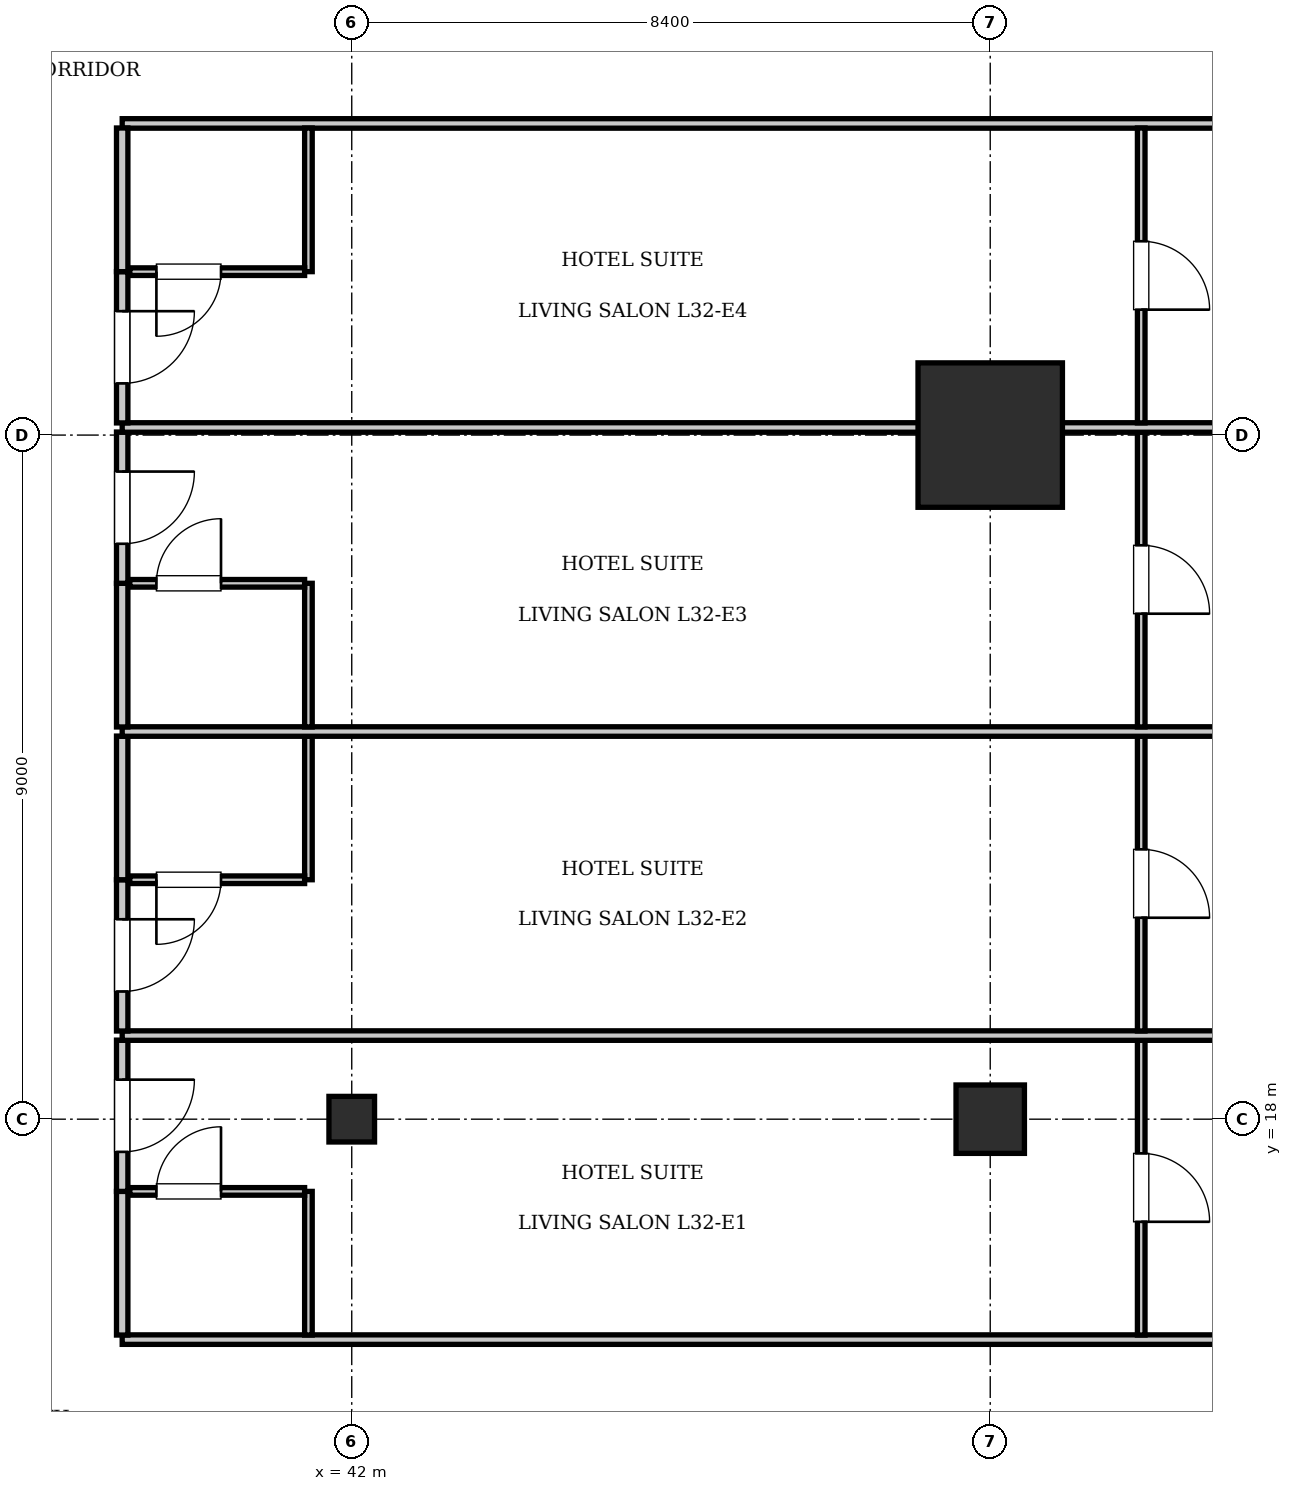
"""IFC4 building model, lengths in metres.
Left out: names, types, materials, properties, quantities, classifications, styles, units other than length and angle.
Written with IfcOpenShell. Run it as: python <this file> out.ifc"""

import sys

from ifc_helpers import new_model, si_unit, direction, frame, frame_2d, origin, origin_2d, place, context, subcontext, project, spatial, rectangle, i_section, extrude, element, fill, save


model = new_model("IFC4")
c1 = context("Model", 3, precision=1e-05, world=origin(), true_north=direction((0.0, 1.0)))
c2 = subcontext(c1, "Body", "Model", "MODEL_VIEW")
j1 = project(units=[si_unit("LENGTHUNIT", "METRE"), si_unit("PLANEANGLEUNIT", "RADIAN")], contexts=[c1])
p1 = place(None, origin())
s1 = spatial("IfcSite", under=j1, at=p1, CompositionType="ELEMENT")
p2 = place(p1, origin())
s2 = spatial("IfcBuilding", under=s1, at=p2, CompositionType="ELEMENT")
p3 = place(p2, frame((0.0, 0.0, 135.1)))
s3 = spatial("IfcBuildingStorey", under=s2, at=p3, CompositionType="ELEMENT", Elevation=135.1)
p4 = place(p3, frame((50.4, 27.0, 0.0), z_axis=(0.0, 0.0, 1.0), x_axis=(1.0, 0.0, 0.0)))
e1 = element("IfcColumn", 1, at=p4, inside=s3, PredefinedType="COLUMN", context=c2, shape_type="SweptSolid", body=[
    extrude(rectangle(XDim=1.9, YDim=1.9, at=origin_2d()), origin(), (0.0, 0.0, 1.0), 3.85),
])
p5 = place(p3, frame((50.4, 18.0, 0.0), z_axis=(0.0, 0.0, 1.0), x_axis=(1.0, 0.0, 0.0)))
e2 = element("IfcColumn", 2, at=p5, inside=s3, PredefinedType="COLUMN", context=c2, shape_type="SweptSolid", body=[
    extrude(rectangle(XDim=0.9, YDim=0.9, at=origin_2d()), origin(), (0.0, 0.0, 1.0), 3.85),
])
p6 = place(p3, frame((42.0, 18.0, 0.0), z_axis=(0.0, 0.0, 1.0), x_axis=(1.0, 0.0, 0.0)))
e3 = element("IfcColumn", 3, at=p6, inside=s3, PredefinedType="COLUMN", context=c2, shape_type="SweptSolid", body=[
    extrude(i_section(OverallWidth=0.6, OverallDepth=0.6, WebThickness=0.025, FlangeThickness=0.038, at=origin_2d()), origin(), (0.0, 0.0, 1.0), 3.85),
])
for number, where, z_axis, x_axis in (
    (4, (38.98, 15.1, 0.0), (0.0, 0.0, 1.0), (1.0, 0.0, 0.0)),
    (5, (38.98, 31.1, 0.0), (0.0, 0.0, 1.0), (1.0, 0.0, 0.0)),
):
    element("IfcWall", number, at=place(p3, frame(where, z_axis=z_axis, x_axis=x_axis)), inside=s3, PredefinedType="PARTITIONING", context=c2, shape_type="SweptSolid", body=[
        extrude(rectangle(XDim=23.42, YDim=0.125, at=frame_2d((11.71, 0.0))), origin(), (0.0, 0.0, 1.0), 3.61),
    ])
p7 = place(p3, frame((38.98, 15.16, 0.0), z_axis=(0.0, 0.0, 1.0), x_axis=(0.0, 1.0, 0.0)))
e6 = element("IfcWall", 6, at=p7, inside=s3, PredefinedType="PARTITIONING", context=c2, shape_type="SweptSolid", body=[
    extrude(rectangle(XDim=1.89, YDim=0.15, at=frame_2d((0.945, 0.0))), origin(), (0.0, 0.0, 1.0), 3.61),
])
p8 = place(p3, frame((38.98, 17.05, 0.0), z_axis=(0.0, 0.0, 1.0), x_axis=(0.0, 1.0, 0.0)))
e7 = element("IfcWall", 7, at=p8, inside=s3, PredefinedType="PARTITIONING", context=c2, shape_type="SweptSolid", body=[
    extrude(rectangle(XDim=1.99, YDim=0.15, at=frame_2d((0.995, 0.0))), origin(), (0.0, 0.0, 1.0), 3.61),
])
p9 = place(p8, frame((0.52, 0.0, 0.0)))
e8 = element("IfcOpeningElement", 8, at=p9, cuts=e7, PredefinedType="OPENING", context=c2, shape_type="SweptSolid", body=[
    extrude(rectangle(XDim=0.95, YDim=2.15, at=frame_2d((0.475, 1.075))), frame((0.0, 0.085, 0.0), z_axis=(0.0, -1.0, 0.0), x_axis=(1.0, 0.0, 0.0)), (0.0, 0.0, 1.0), 0.17),
])
p10 = place(p3, frame((41.43, 15.16, 0.0), z_axis=(0.0, 0.0, 1.0), x_axis=(0.0, 1.0, 0.0)))
e9 = element("IfcWall", 9, at=p10, inside=s3, PredefinedType="PARTITIONING", context=c2, shape_type="SweptSolid", body=[
    extrude(rectangle(XDim=1.89, YDim=0.1, at=frame_2d((0.945, 0.0))), origin(), (0.0, 0.0, 1.0), 3.61),
])
p11 = place(p3, frame((39.08, 17.05, 0.0), z_axis=(0.0, 0.0, 1.0), x_axis=(1.0, 0.0, 0.0)))
e10 = element("IfcWall", 10, at=p11, inside=s3, PredefinedType="PARTITIONING", context=c2, shape_type="SweptSolid", body=[
    extrude(rectangle(XDim=2.3, YDim=0.1, at=frame_2d((1.15, 0.0))), origin(), (0.0, 0.0, 1.0), 3.61),
])
p12 = place(p11, frame((0.35, 0.0, 0.0)))
e11 = element("IfcOpeningElement", 11, at=p12, cuts=e10, PredefinedType="OPENING", context=c2, shape_type="SweptSolid", body=[
    extrude(rectangle(XDim=0.85, YDim=2.1, at=frame_2d((0.425, 1.05))), frame((0.0, 0.06, 0.0), z_axis=(0.0, -1.0, 0.0), x_axis=(1.0, 0.0, 0.0)), (0.0, 0.0, 1.0), 0.12),
])
p13 = place(p3, frame((52.386, 15.16, 0.0), z_axis=(0.0, 0.0, 1.0), x_axis=(0.0, 1.0, 0.0)))
e12 = element("IfcWall", 12, at=p13, inside=s3, PredefinedType="PARTITIONING", context=c2, shape_type="SweptSolid", body=[
    extrude(rectangle(XDim=3.88, YDim=0.1, at=frame_2d((1.94, 0.0))), origin(), (0.0, 0.0, 1.0), 3.61),
])
p14 = place(p13, frame((1.49, 0.0, 0.0)))
e13 = element("IfcOpeningElement", 13, at=p14, cuts=e12, PredefinedType="OPENING", context=c2, shape_type="SweptSolid", body=[
    extrude(rectangle(XDim=0.9, YDim=2.1, at=frame_2d((0.45, 1.05))), frame((0.0, 0.06, 0.0), z_axis=(0.0, -1.0, 0.0), x_axis=(1.0, 0.0, 0.0)), (0.0, 0.0, 1.0), 0.12),
])
p15 = place(p3, frame((38.98, 19.1, 0.0), z_axis=(0.0, 0.0, 1.0), x_axis=(1.0, 0.0, 0.0)))
e14 = element("IfcWall", 14, at=p15, inside=s3, PredefinedType="PARTITIONING", context=c2, shape_type="SweptSolid", body=[
    extrude(rectangle(XDim=23.42, YDim=0.125, at=frame_2d((11.71, 0.0))), origin(), (0.0, 0.0, 1.0), 3.61),
])
p16 = place(p3, frame((38.98, 19.16, 0.0), z_axis=(0.0, 0.0, 1.0), x_axis=(0.0, 1.0, 0.0)))
e15 = element("IfcWall", 15, at=p16, inside=s3, PredefinedType="PARTITIONING", context=c2, shape_type="SweptSolid", body=[
    extrude(rectangle(XDim=1.99, YDim=0.15, at=frame_2d((0.995, 0.0))), origin(), (0.0, 0.0, 1.0), 3.61),
])
p17 = place(p16, frame((0.52, 0.0, 0.0)))
e16 = element("IfcOpeningElement", 16, at=p17, cuts=e15, PredefinedType="OPENING", context=c2, shape_type="SweptSolid", body=[
    extrude(rectangle(XDim=0.95, YDim=2.15, at=frame_2d((0.475, 1.075))), frame((0.0, 0.085, 0.0), z_axis=(0.0, -1.0, 0.0), x_axis=(1.0, 0.0, 0.0)), (0.0, 0.0, 1.0), 0.17),
])
p18 = place(p3, frame((38.98, 21.15, 0.0), z_axis=(0.0, 0.0, 1.0), x_axis=(0.0, 1.0, 0.0)))
e17 = element("IfcWall", 17, at=p18, inside=s3, PredefinedType="PARTITIONING", context=c2, shape_type="SweptSolid", body=[
    extrude(rectangle(XDim=1.89, YDim=0.15, at=frame_2d((0.945, 0.0))), origin(), (0.0, 0.0, 1.0), 3.61),
])
p19 = place(p3, frame((41.43, 21.15, 0.0), z_axis=(0.0, 0.0, 1.0), x_axis=(0.0, 1.0, 0.0)))
e18 = element("IfcWall", 18, at=p19, inside=s3, PredefinedType="PARTITIONING", context=c2, shape_type="SweptSolid", body=[
    extrude(rectangle(XDim=1.89, YDim=0.1, at=frame_2d((0.945, 0.0))), origin(), (0.0, 0.0, 1.0), 3.61),
])
p20 = place(p3, frame((39.08, 21.15, 0.0), z_axis=(0.0, 0.0, 1.0), x_axis=(1.0, 0.0, 0.0)))
e19 = element("IfcWall", 19, at=p20, inside=s3, PredefinedType="PARTITIONING", context=c2, shape_type="SweptSolid", body=[
    extrude(rectangle(XDim=2.3, YDim=0.1, at=frame_2d((1.15, 0.0))), origin(), (0.0, 0.0, 1.0), 3.61),
])
p21 = place(p20, frame((0.35, 0.0, 0.0)))
e20 = element("IfcOpeningElement", 20, at=p21, cuts=e19, PredefinedType="OPENING", context=c2, shape_type="SweptSolid", body=[
    extrude(rectangle(XDim=0.85, YDim=2.1, at=frame_2d((0.425, 1.05))), frame((0.0, 0.06, 0.0), z_axis=(0.0, -1.0, 0.0), x_axis=(1.0, 0.0, 0.0)), (0.0, 0.0, 1.0), 0.12),
])
p22 = place(p3, frame((52.386, 19.16, 0.0), z_axis=(0.0, 0.0, 1.0), x_axis=(0.0, 1.0, 0.0)))
e21 = element("IfcWall", 21, at=p22, inside=s3, PredefinedType="PARTITIONING", context=c2, shape_type="SweptSolid", body=[
    extrude(rectangle(XDim=3.88, YDim=0.1, at=frame_2d((1.94, 0.0))), origin(), (0.0, 0.0, 1.0), 3.61),
])
p23 = place(p22, frame((1.49, 0.0, 0.0)))
e22 = element("IfcOpeningElement", 22, at=p23, cuts=e21, PredefinedType="OPENING", context=c2, shape_type="SweptSolid", body=[
    extrude(rectangle(XDim=0.9, YDim=2.1, at=frame_2d((0.45, 1.05))), frame((0.0, 0.06, 0.0), z_axis=(0.0, -1.0, 0.0), x_axis=(1.0, 0.0, 0.0)), (0.0, 0.0, 1.0), 0.12),
])
p24 = place(p3, frame((38.98, 23.1, 0.0), z_axis=(0.0, 0.0, 1.0), x_axis=(1.0, 0.0, 0.0)))
e23 = element("IfcWall", 23, at=p24, inside=s3, PredefinedType="PARTITIONING", context=c2, shape_type="SweptSolid", body=[
    extrude(rectangle(XDim=23.42, YDim=0.125, at=frame_2d((11.71, 0.0))), origin(), (0.0, 0.0, 1.0), 3.61),
])
p25 = place(p3, frame((38.98, 23.16, 0.0), z_axis=(0.0, 0.0, 1.0), x_axis=(0.0, 1.0, 0.0)))
e24 = element("IfcWall", 24, at=p25, inside=s3, PredefinedType="PARTITIONING", context=c2, shape_type="SweptSolid", body=[
    extrude(rectangle(XDim=1.89, YDim=0.15, at=frame_2d((0.945, 0.0))), origin(), (0.0, 0.0, 1.0), 3.61),
])
p26 = place(p3, frame((38.98, 25.05, 0.0), z_axis=(0.0, 0.0, 1.0), x_axis=(0.0, 1.0, 0.0)))
e25 = element("IfcWall", 25, at=p26, inside=s3, PredefinedType="PARTITIONING", context=c2, shape_type="SweptSolid", body=[
    extrude(rectangle(XDim=1.99, YDim=0.15, at=frame_2d((0.995, 0.0))), origin(), (0.0, 0.0, 1.0), 3.61),
])
p27 = place(p26, frame((0.52, 0.0, 0.0)))
e26 = element("IfcOpeningElement", 26, at=p27, cuts=e25, PredefinedType="OPENING", context=c2, shape_type="SweptSolid", body=[
    extrude(rectangle(XDim=0.95, YDim=2.15, at=frame_2d((0.475, 1.075))), frame((0.0, 0.085, 0.0), z_axis=(0.0, -1.0, 0.0), x_axis=(1.0, 0.0, 0.0)), (0.0, 0.0, 1.0), 0.17),
])
p28 = place(p3, frame((41.43, 23.16, 0.0), z_axis=(0.0, 0.0, 1.0), x_axis=(0.0, 1.0, 0.0)))
e27 = element("IfcWall", 27, at=p28, inside=s3, PredefinedType="PARTITIONING", context=c2, shape_type="SweptSolid", body=[
    extrude(rectangle(XDim=1.89, YDim=0.1, at=frame_2d((0.945, 0.0))), origin(), (0.0, 0.0, 1.0), 3.61),
])
p29 = place(p3, frame((39.08, 25.05, 0.0), z_axis=(0.0, 0.0, 1.0), x_axis=(1.0, 0.0, 0.0)))
e28 = element("IfcWall", 28, at=p29, inside=s3, PredefinedType="PARTITIONING", context=c2, shape_type="SweptSolid", body=[
    extrude(rectangle(XDim=2.3, YDim=0.1, at=frame_2d((1.15, 0.0))), origin(), (0.0, 0.0, 1.0), 3.61),
])
p30 = place(p29, frame((0.35, 0.0, 0.0)))
e29 = element("IfcOpeningElement", 29, at=p30, cuts=e28, PredefinedType="OPENING", context=c2, shape_type="SweptSolid", body=[
    extrude(rectangle(XDim=0.85, YDim=2.1, at=frame_2d((0.425, 1.05))), frame((0.0, 0.06, 0.0), z_axis=(0.0, -1.0, 0.0), x_axis=(1.0, 0.0, 0.0)), (0.0, 0.0, 1.0), 0.12),
])
p31 = place(p3, frame((52.386, 23.16, 0.0), z_axis=(0.0, 0.0, 1.0), x_axis=(0.0, 1.0, 0.0)))
e30 = element("IfcWall", 30, at=p31, inside=s3, PredefinedType="PARTITIONING", context=c2, shape_type="SweptSolid", body=[
    extrude(rectangle(XDim=3.88, YDim=0.1, at=frame_2d((1.94, 0.0))), origin(), (0.0, 0.0, 1.0), 3.61),
])
p32 = place(p31, frame((1.49, 0.0, 0.0)))
e31 = element("IfcOpeningElement", 31, at=p32, cuts=e30, PredefinedType="OPENING", context=c2, shape_type="SweptSolid", body=[
    extrude(rectangle(XDim=0.9, YDim=2.1, at=frame_2d((0.45, 1.05))), frame((0.0, 0.06, 0.0), z_axis=(0.0, -1.0, 0.0), x_axis=(1.0, 0.0, 0.0)), (0.0, 0.0, 1.0), 0.12),
])
p33 = place(p3, frame((38.98, 27.1, 0.0), z_axis=(0.0, 0.0, 1.0), x_axis=(1.0, 0.0, 0.0)))
e32 = element("IfcWall", 32, at=p33, inside=s3, PredefinedType="PARTITIONING", context=c2, shape_type="SweptSolid", body=[
    extrude(rectangle(XDim=23.42, YDim=0.125, at=frame_2d((11.71, 0.0))), origin(), (0.0, 0.0, 1.0), 2.41),
])
p34 = place(p3, frame((38.98, 27.16, 0.0), z_axis=(0.0, 0.0, 1.0), x_axis=(0.0, 1.0, 0.0)))
e33 = element("IfcWall", 33, at=p34, inside=s3, PredefinedType="PARTITIONING", context=c2, shape_type="SweptSolid", body=[
    extrude(rectangle(XDim=1.99, YDim=0.15, at=frame_2d((0.995, 0.0))), origin(), (0.0, 0.0, 1.0), 3.61),
])
p35 = place(p34, frame((0.52, 0.0, 0.0)))
e34 = element("IfcOpeningElement", 34, at=p35, cuts=e33, PredefinedType="OPENING", context=c2, shape_type="SweptSolid", body=[
    extrude(rectangle(XDim=0.95, YDim=2.15, at=frame_2d((0.475, 1.075))), frame((0.0, 0.085, 0.0), z_axis=(0.0, -1.0, 0.0), x_axis=(1.0, 0.0, 0.0)), (0.0, 0.0, 1.0), 0.17),
])
p36 = place(p3, frame((38.98, 29.15, 0.0), z_axis=(0.0, 0.0, 1.0), x_axis=(0.0, 1.0, 0.0)))
e35 = element("IfcWall", 35, at=p36, inside=s3, PredefinedType="PARTITIONING", context=c2, shape_type="SweptSolid", body=[
    extrude(rectangle(XDim=1.89, YDim=0.15, at=frame_2d((0.945, 0.0))), origin(), (0.0, 0.0, 1.0), 3.61),
])
p37 = place(p3, frame((41.43, 29.15, 0.0), z_axis=(0.0, 0.0, 1.0), x_axis=(0.0, 1.0, 0.0)))
e36 = element("IfcWall", 36, at=p37, inside=s3, PredefinedType="PARTITIONING", context=c2, shape_type="SweptSolid", body=[
    extrude(rectangle(XDim=1.89, YDim=0.1, at=frame_2d((0.945, 0.0))), origin(), (0.0, 0.0, 1.0), 3.61),
])
p38 = place(p3, frame((39.08, 29.15, 0.0), z_axis=(0.0, 0.0, 1.0), x_axis=(1.0, 0.0, 0.0)))
e37 = element("IfcWall", 37, at=p38, inside=s3, PredefinedType="PARTITIONING", context=c2, shape_type="SweptSolid", body=[
    extrude(rectangle(XDim=2.3, YDim=0.1, at=frame_2d((1.15, 0.0))), origin(), (0.0, 0.0, 1.0), 3.61),
])
p39 = place(p38, frame((0.35, 0.0, 0.0)))
e38 = element("IfcOpeningElement", 38, at=p39, cuts=e37, PredefinedType="OPENING", context=c2, shape_type="SweptSolid", body=[
    extrude(rectangle(XDim=0.85, YDim=2.1, at=frame_2d((0.425, 1.05))), frame((0.0, 0.06, 0.0), z_axis=(0.0, -1.0, 0.0), x_axis=(1.0, 0.0, 0.0)), (0.0, 0.0, 1.0), 0.12),
])
p40 = place(p3, frame((52.386, 27.16, 0.0), z_axis=(0.0, 0.0, 1.0), x_axis=(0.0, 1.0, 0.0)))
e39 = element("IfcWall", 39, at=p40, inside=s3, PredefinedType="PARTITIONING", context=c2, shape_type="SweptSolid", body=[
    extrude(rectangle(XDim=3.88, YDim=0.1, at=frame_2d((1.94, 0.0))), origin(), (0.0, 0.0, 1.0), 3.61),
])
p41 = place(p40, frame((1.49, 0.0, 0.0)))
e40 = element("IfcOpeningElement", 40, at=p41, cuts=e39, PredefinedType="OPENING", context=c2, shape_type="SweptSolid", body=[
    extrude(rectangle(XDim=0.9, YDim=2.1, at=frame_2d((0.45, 1.05))), frame((0.0, 0.06, 0.0), z_axis=(0.0, -1.0, 0.0), x_axis=(1.0, 0.0, 0.0)), (0.0, 0.0, 1.0), 0.12),
])
p42 = place(p12, origin())
e41 = element("IfcDoor", 41, at=p42, inside=s3, OperationType="SINGLE_SWING_RIGHT", PredefinedType="DOOR", context=c2, shape_type="SweptSolid", body=[
    extrude(rectangle(XDim=0.85, YDim=2.1, at=frame_2d((0.425, 1.05))), frame((0.0, 0.025, 0.0), z_axis=(0.0, -1.0, 0.0), x_axis=(1.0, 0.0, 0.0)), (0.0, 0.0, 1.0), 0.05),
])
fill(e11, e41)
p43 = place(p9, frame((0.95, 0.0, 0.0), z_axis=(0.0, 0.0, 1.0), x_axis=(-1.0, 0.0, 0.0)))
e42 = element("IfcDoor", 42, at=p43, inside=s3, OperationType="SINGLE_SWING_LEFT", PredefinedType="DOOR", context=c2, shape_type="SweptSolid", body=[
    extrude(rectangle(XDim=0.95, YDim=2.15, at=frame_2d((0.475, 1.075))), frame((0.0, 0.025, 0.0), z_axis=(0.0, -1.0, 0.0), x_axis=(1.0, 0.0, 0.0)), (0.0, 0.0, 1.0), 0.05),
])
fill(e8, e42)
p44 = place(p14, frame((0.9, 0.0, 0.0), z_axis=(0.0, 0.0, 1.0), x_axis=(-1.0, 0.0, 0.0)))
e43 = element("IfcDoor", 43, at=p44, inside=s3, OperationType="SINGLE_SWING_RIGHT", PredefinedType="DOOR", context=c2, shape_type="SweptSolid", body=[
    extrude(rectangle(XDim=0.9, YDim=2.1, at=frame_2d((0.45, 1.05))), frame((0.0, 0.025, 0.0), z_axis=(0.0, -1.0, 0.0), x_axis=(1.0, 0.0, 0.0)), (0.0, 0.0, 1.0), 0.05),
])
fill(e13, e43)
p45 = place(p21, frame((0.85, 0.0, 0.0), z_axis=(0.0, 0.0, 1.0), x_axis=(-1.0, 0.0, 0.0)))
e44 = element("IfcDoor", 44, at=p45, inside=s3, OperationType="SINGLE_SWING_RIGHT", PredefinedType="DOOR", context=c2, shape_type="SweptSolid", body=[
    extrude(rectangle(XDim=0.85, YDim=2.1, at=frame_2d((0.425, 1.05))), frame((0.0, 0.025, 0.0), z_axis=(0.0, -1.0, 0.0), x_axis=(1.0, 0.0, 0.0)), (0.0, 0.0, 1.0), 0.05),
])
fill(e20, e44)
p46 = place(p17, frame((0.95, 0.0, 0.0), z_axis=(0.0, 0.0, 1.0), x_axis=(-1.0, 0.0, 0.0)))
e45 = element("IfcDoor", 45, at=p46, inside=s3, OperationType="SINGLE_SWING_LEFT", PredefinedType="DOOR", context=c2, shape_type="SweptSolid", body=[
    extrude(rectangle(XDim=0.95, YDim=2.15, at=frame_2d((0.475, 1.075))), frame((0.0, 0.025, 0.0), z_axis=(0.0, -1.0, 0.0), x_axis=(1.0, 0.0, 0.0)), (0.0, 0.0, 1.0), 0.05),
])
fill(e16, e45)
p47 = place(p23, frame((0.9, 0.0, 0.0), z_axis=(0.0, 0.0, 1.0), x_axis=(-1.0, 0.0, 0.0)))
e46 = element("IfcDoor", 46, at=p47, inside=s3, OperationType="SINGLE_SWING_RIGHT", PredefinedType="DOOR", context=c2, shape_type="SweptSolid", body=[
    extrude(rectangle(XDim=0.9, YDim=2.1, at=frame_2d((0.45, 1.05))), frame((0.0, 0.025, 0.0), z_axis=(0.0, -1.0, 0.0), x_axis=(1.0, 0.0, 0.0)), (0.0, 0.0, 1.0), 0.05),
])
fill(e22, e46)
p48 = place(p30, origin())
e47 = element("IfcDoor", 47, at=p48, inside=s3, OperationType="SINGLE_SWING_RIGHT", PredefinedType="DOOR", context=c2, shape_type="SweptSolid", body=[
    extrude(rectangle(XDim=0.85, YDim=2.1, at=frame_2d((0.425, 1.05))), frame((0.0, 0.025, 0.0), z_axis=(0.0, -1.0, 0.0), x_axis=(1.0, 0.0, 0.0)), (0.0, 0.0, 1.0), 0.05),
])
fill(e29, e47)
p49 = place(p27, frame((0.95, 0.0, 0.0), z_axis=(0.0, 0.0, 1.0), x_axis=(-1.0, 0.0, 0.0)))
e48 = element("IfcDoor", 48, at=p49, inside=s3, OperationType="SINGLE_SWING_LEFT", PredefinedType="DOOR", context=c2, shape_type="SweptSolid", body=[
    extrude(rectangle(XDim=0.95, YDim=2.15, at=frame_2d((0.475, 1.075))), frame((0.0, 0.025, 0.0), z_axis=(0.0, -1.0, 0.0), x_axis=(1.0, 0.0, 0.0)), (0.0, 0.0, 1.0), 0.05),
])
fill(e26, e48)
p50 = place(p32, frame((0.9, 0.0, 0.0), z_axis=(0.0, 0.0, 1.0), x_axis=(-1.0, 0.0, 0.0)))
e49 = element("IfcDoor", 49, at=p50, inside=s3, OperationType="SINGLE_SWING_RIGHT", PredefinedType="DOOR", context=c2, shape_type="SweptSolid", body=[
    extrude(rectangle(XDim=0.9, YDim=2.1, at=frame_2d((0.45, 1.05))), frame((0.0, 0.025, 0.0), z_axis=(0.0, -1.0, 0.0), x_axis=(1.0, 0.0, 0.0)), (0.0, 0.0, 1.0), 0.05),
])
fill(e31, e49)
p51 = place(p39, frame((0.85, 0.0, 0.0), z_axis=(0.0, 0.0, 1.0), x_axis=(-1.0, 0.0, 0.0)))
e50 = element("IfcDoor", 50, at=p51, inside=s3, OperationType="SINGLE_SWING_RIGHT", PredefinedType="DOOR", context=c2, shape_type="SweptSolid", body=[
    extrude(rectangle(XDim=0.85, YDim=2.1, at=frame_2d((0.425, 1.05))), frame((0.0, 0.025, 0.0), z_axis=(0.0, -1.0, 0.0), x_axis=(1.0, 0.0, 0.0)), (0.0, 0.0, 1.0), 0.05),
])
fill(e38, e50)
p52 = place(p35, frame((0.95, 0.0, 0.0), z_axis=(0.0, 0.0, 1.0), x_axis=(-1.0, 0.0, 0.0)))
e51 = element("IfcDoor", 51, at=p52, inside=s3, OperationType="SINGLE_SWING_LEFT", PredefinedType="DOOR", context=c2, shape_type="SweptSolid", body=[
    extrude(rectangle(XDim=0.95, YDim=2.15, at=frame_2d((0.475, 1.075))), frame((0.0, 0.025, 0.0), z_axis=(0.0, -1.0, 0.0), x_axis=(1.0, 0.0, 0.0)), (0.0, 0.0, 1.0), 0.05),
])
fill(e34, e51)
p53 = place(p41, frame((0.9, 0.0, 0.0), z_axis=(0.0, 0.0, 1.0), x_axis=(-1.0, 0.0, 0.0)))
e52 = element("IfcDoor", 52, at=p53, inside=s3, OperationType="SINGLE_SWING_RIGHT", PredefinedType="DOOR", context=c2, shape_type="SweptSolid", body=[
    extrude(rectangle(XDim=0.9, YDim=2.1, at=frame_2d((0.45, 1.05))), frame((0.0, 0.025, 0.0), z_axis=(0.0, -1.0, 0.0), x_axis=(1.0, 0.0, 0.0)), (0.0, 0.0, 1.0), 0.05),
])
fill(e40, e52)
save(model, sys.argv[1])
